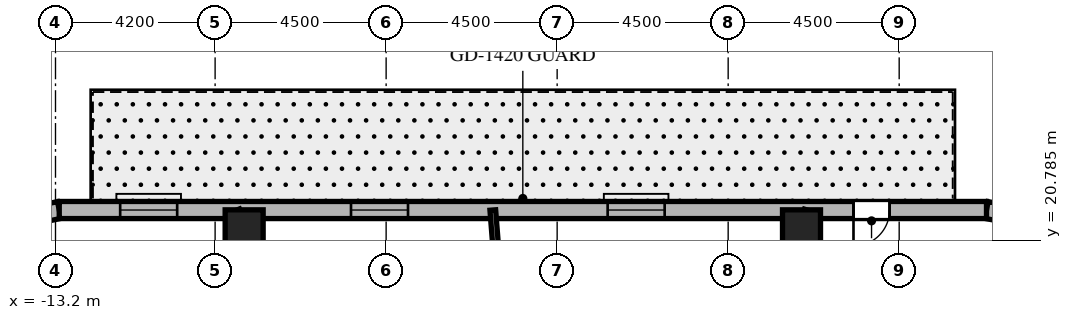
"""IFC4 building model, lengths in metres.
Left out: names, types, materials, properties, quantities, classifications, styles, units other than length and angle.
Written with IfcOpenShell. Run it as: python <this file> out.ifc"""

import sys

from ifc_helpers import new_model, si_unit, direction, frame, frame_2d, origin, origin_2d, place, context, subcontext, project, spatial, rectangle, extrude, element, fill, save


model = new_model("IFC4")
c1 = context("Model", 3, precision=1e-05, world=origin(), true_north=direction((0.0, 1.0)))
c2 = subcontext(c1, "Body", "Model", "MODEL_VIEW")
j1 = project(units=[si_unit("LENGTHUNIT", "METRE"), si_unit("PLANEANGLEUNIT", "RADIAN")], contexts=[c1])
p1 = place(None, origin())
s1 = spatial("IfcSite", under=j1, at=p1, CompositionType="ELEMENT")
p2 = place(p1, origin())
s2 = spatial("IfcBuilding", under=s1, at=p2, CompositionType="ELEMENT")
p3 = place(p2, frame((0.0, 0.0, 210.3)))
s3 = spatial("IfcBuildingStorey", under=s2, at=p3, CompositionType="ELEMENT", Elevation=210.3)
for number, where, z_axis, x_axis in (
    (1, (6.43, 21.08, 0.0), (0.0, 0.0, 1.0), (1.0, 0.0, 0.0)),
    (2, (-8.236, 21.08, 0.0), (0.0, 0.0, 1.0), (1.0, 0.0, 0.0)),
):
    element("IfcColumn", number, at=place(p3, frame(where, z_axis=z_axis, x_axis=x_axis)), inside=s3, PredefinedType="COLUMN", context=c2, shape_type="SweptSolid", body=[
        extrude(rectangle(XDim=1.0, YDim=1.0, at=origin_2d()), origin(), (0.0, 0.0, 1.0), 3.8),
    ])
p4 = place(p3, frame((12.546, 21.34, 0.0), z_axis=(0.0, 0.0, 1.0), x_axis=(-0.982686750835, 0.18527479519, 0.0)))
e3 = element("IfcWall", 3, at=p4, inside=s3, PredefinedType="SOLIDWALL", context=c2, shape_type="SweptSolid", body=[
    extrude(rectangle(XDim=1.27, YDim=0.45, at=frame_2d((0.635, 0.0))), origin(), (0.0, 0.0, 1.0), 3.5),
])
p5 = place(p3, frame((-13.102, 21.575, 0.0), z_axis=(0.0, 0.0, 1.0), x_axis=(-0.978757421505, -0.205021730188, 0.0)))
e4 = element("IfcWall", 4, at=p5, inside=s3, PredefinedType="SOLIDWALL", context=c2, shape_type="SweptSolid", body=[
    extrude(rectangle(XDim=1.406, YDim=0.45, at=frame_2d((0.703, 0.0))), origin(), (0.0, 0.0, 1.0), 3.5),
])
p6 = place(p3, frame((11.298, 21.575, 0.0), z_axis=(0.0, 0.0, 1.0), x_axis=(-1.0, 0.0, 0.0)))
e5 = element("IfcWall", 5, at=p6, inside=s3, PredefinedType="SOLIDWALL", context=c2, shape_type="SweptSolid", body=[
    extrude(rectangle(XDim=24.399, YDim=0.45, at=frame_2d((12.2, 0.0))), origin(), (0.0, 0.0, 1.0), 3.5),
])
p7 = place(p6, frame((2.55, 0.0, 0.0)))
e6 = element("IfcOpeningElement", 6, at=p7, cuts=e5, PredefinedType="OPENING", context=c2, shape_type="SweptSolid", body=[
    extrude(rectangle(XDim=0.95, YDim=2.15, at=frame_2d((0.475, 1.075))), frame((0.0, 0.235, 0.0), z_axis=(0.0, -1.0, 0.0), x_axis=(1.0, 0.0, 0.0)), (0.0, 0.0, 1.0), 0.47),
])
p8 = place(p6, frame((8.469, 0.0, 0.8)))
e7 = element("IfcOpeningElement", 7, at=p8, cuts=e5, PredefinedType="OPENING", context=c2, shape_type="SweptSolid", body=[
    extrude(rectangle(XDim=1.5, YDim=1.8, at=frame_2d((0.75, 0.9))), frame((0.0, 0.235, 0.0), z_axis=(0.0, -1.0, 0.0), x_axis=(1.0, 0.0, 0.0)), (0.0, 0.0, 1.0), 0.47),
])
p9 = place(p6, frame((15.222, 0.0, 0.8)))
e8 = element("IfcOpeningElement", 8, at=p9, cuts=e5, PredefinedType="OPENING", context=c2, shape_type="SweptSolid", body=[
    extrude(rectangle(XDim=1.5, YDim=1.8, at=frame_2d((0.75, 0.9))), frame((0.0, 0.235, 0.0), z_axis=(0.0, -1.0, 0.0), x_axis=(1.0, 0.0, 0.0)), (0.0, 0.0, 1.0), 0.47),
])
p10 = place(p6, frame((21.296, 0.0, 0.8)))
e9 = element("IfcOpeningElement", 9, at=p10, cuts=e5, PredefinedType="OPENING", context=c2, shape_type="SweptSolid", body=[
    extrude(rectangle(XDim=1.5, YDim=1.8, at=frame_2d((0.75, 0.9))), frame((0.0, 0.235, 0.0), z_axis=(0.0, -1.0, 0.0), x_axis=(1.0, 0.0, 0.0)), (0.0, 0.0, 1.0), 0.47),
])
p11 = place(p3, frame((3.004, 9.85, 0.0), z_axis=(0.0, 0.0, 1.0), x_axis=(0.291775760688, 0.956486751333, 0.0)))
e10 = element("IfcWall", 10, at=p11, inside=s3, PredefinedType="PARTITIONING", context=c2, shape_type="SweptSolid", body=[
    extrude(rectangle(XDim=12.258, YDim=0.15, at=frame_2d((6.129, 0.0))), origin(), (0.0, 0.0, 1.0), 2.74),
])
p12 = place(p3, frame((-1.1, 14.018, 0.0), z_axis=(0.0, 0.0, 1.0), x_axis=(-0.078228275349, 0.996935472804, 0.0)))
e11 = element("IfcWall", 11, at=p12, inside=s3, PredefinedType="PARTITIONING", context=c2, shape_type="SweptSolid", body=[
    extrude(rectangle(XDim=7.581, YDim=0.15, at=frame_2d((3.79, 0.0))), origin(), (0.0, 0.0, 1.0), 2.74),
])
p13 = place(p3, frame((-3.848, 9.85, 0.0), z_axis=(0.0, 0.0, 1.0), x_axis=(-0.363921778212, 0.931429513889, 0.0)))
e12 = element("IfcWall", 12, at=p13, inside=s3, PredefinedType="PARTITIONING", context=c2, shape_type="SweptSolid", body=[
    extrude(rectangle(XDim=12.588, YDim=0.15, at=frame_2d((6.294, 0.0))), origin(), (0.0, 0.0, 1.0), 2.74),
])
p14 = place(p7, origin())
e13 = element("IfcDoor", 13, at=p14, inside=s3, OperationType="SINGLE_SWING_RIGHT", PredefinedType="DOOR", context=c2, shape_type="SweptSolid", body=[
    extrude(rectangle(XDim=0.95, YDim=2.15, at=frame_2d((0.475, 1.075))), frame((0.0, 0.025, 0.0), z_axis=(0.0, -1.0, 0.0), x_axis=(1.0, 0.0, 0.0)), (0.0, 0.0, 1.0), 0.05),
])
fill(e6, e13)
p15 = place(p8, origin())
e14 = element("IfcWindow", 14, at=p15, inside=s3, PartitioningType="SINGLE_PANEL", PredefinedType="WINDOW", context=c2, shape_type="SweptSolid", body=[
    extrude(rectangle(XDim=1.5, YDim=1.8, at=frame_2d((0.75, 0.9))), frame((0.0, 0.03, 0.0), z_axis=(0.0, -1.0, 0.0), x_axis=(1.0, 0.0, 0.0)), (0.0, 0.0, 1.0), 0.06),
])
fill(e7, e14)
p16 = place(p9, origin())
e15 = element("IfcWindow", 15, at=p16, inside=s3, PartitioningType="SINGLE_PANEL", PredefinedType="WINDOW", context=c2, shape_type="SweptSolid", body=[
    extrude(rectangle(XDim=1.5, YDim=1.8, at=frame_2d((0.75, 0.9))), frame((0.0, 0.03, 0.0), z_axis=(0.0, -1.0, 0.0), x_axis=(1.0, 0.0, 0.0)), (0.0, 0.0, 1.0), 0.06),
])
fill(e8, e15)
p17 = place(p10, origin())
e16 = element("IfcWindow", 16, at=p17, inside=s3, PartitioningType="SINGLE_PANEL", PredefinedType="WINDOW", context=c2, shape_type="SweptSolid", body=[
    extrude(rectangle(XDim=1.5, YDim=1.8, at=frame_2d((0.75, 0.9))), frame((0.0, 0.03, 0.0), z_axis=(0.0, -1.0, 0.0), x_axis=(1.0, 0.0, 0.0)), (0.0, 0.0, 1.0), 0.06),
])
fill(e9, e16)
save(model, sys.argv[1])
